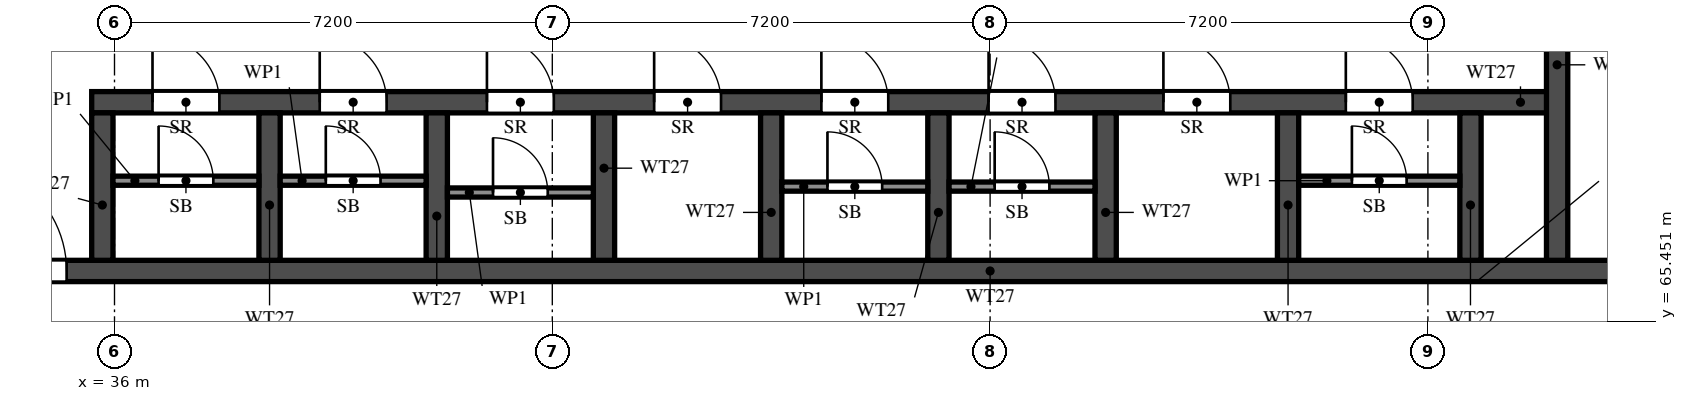
"""IFC4 building model, lengths in metres.
Left out: names, types, materials, properties, quantities, classifications, styles, units other than length and angle.
Written with IfcOpenShell. Run it as: python <this file> out.ifc"""

import sys

from ifc_helpers import new_model, si_unit, direction, frame, frame_2d, origin, place, context, subcontext, project, spatial, rectangle, extrude, element, fill, save


model = new_model("IFC4")
c1 = context("Model", 3, precision=1e-05, world=origin(), true_north=direction((0.0, 1.0)))
c2 = subcontext(c1, "Body", "Model", "MODEL_VIEW")
j1 = project(units=[si_unit("LENGTHUNIT", "METRE"), si_unit("PLANEANGLEUNIT", "RADIAN")], contexts=[c1])
p1 = place(None, origin())
s1 = spatial("IfcSite", under=j1, at=p1, CompositionType="ELEMENT")
p2 = place(p1, origin())
s2 = spatial("IfcBuilding", under=s1, at=p2, CompositionType="ELEMENT")
p3 = place(p2, frame((0.0, 0.0, 153.5)))
s3 = spatial("IfcBuildingStorey", under=s2, at=p3, CompositionType="ELEMENT", Elevation=153.5)
p4 = place(p3, frame((29.7, 66.275, 0.0), z_axis=(0.0, 0.0, 1.0), x_axis=(1.0, 0.0, 0.0)))
e1 = element("IfcWall", 1, at=p4, inside=s3, PredefinedType="SHEAR", context=c2, shape_type="SweptSolid", body=[
    extrude(rectangle(XDim=41.4, YDim=0.35, at=frame_2d((20.7, 0.0))), origin(), (0.0, 0.0, 1.0), 3.2),
])
p5 = place(p4, frame((0.925, 0.0, 0.0)))
e2 = element("IfcOpeningElement", 2, at=p5, cuts=e1, PredefinedType="OPENING", context=c2, shape_type="SweptSolid", body=[
    extrude(rectangle(XDim=1.1, YDim=2.1, at=frame_2d((0.55, 1.05))), frame((0.0, 0.185, 0.0), z_axis=(0.0, -1.0, 0.0), x_axis=(1.0, 0.0, 0.0)), (0.0, 0.0, 1.0), 0.37),
])
p6 = place(p4, frame((3.712, 0.0, 0.0)))
e3 = element("IfcOpeningElement", 3, at=p6, cuts=e1, PredefinedType="OPENING", context=c2, shape_type="SweptSolid", body=[
    extrude(rectangle(XDim=1.8, YDim=2.1, at=frame_2d((0.9, 1.05))), frame((0.0, 0.185, 0.0), z_axis=(0.0, -1.0, 0.0), x_axis=(1.0, 0.0, 0.0)), (0.0, 0.0, 1.0), 0.37),
])
p7 = place(p3, frame((35.625, 69.05, 0.0), z_axis=(0.0, 0.0, 1.0), x_axis=(1.0, 0.0, 0.0)))
e4 = element("IfcWall", 4, at=p7, inside=s3, PredefinedType="SHEAR", context=c2, shape_type="SweptSolid", body=[
    extrude(rectangle(XDim=24.1, YDim=0.35, at=frame_2d((12.05, 0.0))), origin(), (0.0, 0.0, 1.0), 3.2),
])
p8 = place(p7, frame((1.0, 0.0, 0.0)))
e5 = element("IfcOpeningElement", 5, at=p8, cuts=e4, PredefinedType="OPENING", context=c2, shape_type="SweptSolid", body=[
    extrude(rectangle(XDim=1.1, YDim=2.1, at=frame_2d((0.55, 1.05))), frame((0.0, 0.185, 0.0), z_axis=(0.0, -1.0, 0.0), x_axis=(1.0, 0.0, 0.0)), (0.0, 0.0, 1.0), 0.37),
])
p9 = place(p7, frame((3.75, 0.0, 0.0)))
e6 = element("IfcOpeningElement", 6, at=p9, cuts=e4, PredefinedType="OPENING", context=c2, shape_type="SweptSolid", body=[
    extrude(rectangle(XDim=1.1, YDim=2.1, at=frame_2d((0.55, 1.05))), frame((0.0, 0.185, 0.0), z_axis=(0.0, -1.0, 0.0), x_axis=(1.0, 0.0, 0.0)), (0.0, 0.0, 1.0), 0.37),
])
p10 = place(p7, frame((6.5, 0.0, 0.0)))
e7 = element("IfcOpeningElement", 7, at=p10, cuts=e4, PredefinedType="OPENING", context=c2, shape_type="SweptSolid", body=[
    extrude(rectangle(XDim=1.1, YDim=2.1, at=frame_2d((0.55, 1.05))), frame((0.0, 0.185, 0.0), z_axis=(0.0, -1.0, 0.0), x_axis=(1.0, 0.0, 0.0)), (0.0, 0.0, 1.0), 0.37),
])
p11 = place(p7, frame((9.25, 0.0, 0.0)))
e8 = element("IfcOpeningElement", 8, at=p11, cuts=e4, PredefinedType="OPENING", context=c2, shape_type="SweptSolid", body=[
    extrude(rectangle(XDim=1.1, YDim=2.1, at=frame_2d((0.55, 1.05))), frame((0.0, 0.185, 0.0), z_axis=(0.0, -1.0, 0.0), x_axis=(1.0, 0.0, 0.0)), (0.0, 0.0, 1.0), 0.37),
])
p12 = place(p7, frame((12.0, 0.0, 0.0)))
e9 = element("IfcOpeningElement", 9, at=p12, cuts=e4, PredefinedType="OPENING", context=c2, shape_type="SweptSolid", body=[
    extrude(rectangle(XDim=1.1, YDim=2.1, at=frame_2d((0.55, 1.05))), frame((0.0, 0.185, 0.0), z_axis=(0.0, -1.0, 0.0), x_axis=(1.0, 0.0, 0.0)), (0.0, 0.0, 1.0), 0.37),
])
p13 = place(p7, frame((14.75, 0.0, 0.0)))
e10 = element("IfcOpeningElement", 10, at=p13, cuts=e4, PredefinedType="OPENING", context=c2, shape_type="SweptSolid", body=[
    extrude(rectangle(XDim=1.1, YDim=2.1, at=frame_2d((0.55, 1.05))), frame((0.0, 0.185, 0.0), z_axis=(0.0, -1.0, 0.0), x_axis=(1.0, 0.0, 0.0)), (0.0, 0.0, 1.0), 0.37),
])
p14 = place(p7, frame((17.625, 0.0, 0.0)))
e11 = element("IfcOpeningElement", 11, at=p14, cuts=e4, PredefinedType="OPENING", context=c2, shape_type="SweptSolid", body=[
    extrude(rectangle(XDim=1.1, YDim=2.1, at=frame_2d((0.55, 1.05))), frame((0.0, 0.185, 0.0), z_axis=(0.0, -1.0, 0.0), x_axis=(1.0, 0.0, 0.0)), (0.0, 0.0, 1.0), 0.37),
])
p15 = place(p7, frame((20.625, 0.0, 0.0)))
e12 = element("IfcOpeningElement", 12, at=p15, cuts=e4, PredefinedType="OPENING", context=c2, shape_type="SweptSolid", body=[
    extrude(rectangle(XDim=1.1, YDim=2.1, at=frame_2d((0.55, 1.05))), frame((0.0, 0.185, 0.0), z_axis=(0.0, -1.0, 0.0), x_axis=(1.0, 0.0, 0.0)), (0.0, 0.0, 1.0), 0.37),
])
p16 = place(p3, frame((59.725, 66.45, 0.0), z_axis=(0.0, 0.0, 1.0), x_axis=(0.0, 1.0, 0.0)))
e13 = element("IfcWall", 13, at=p16, inside=s3, PredefinedType="SHEAR", context=c2, shape_type="SweptSolid", body=[
    extrude(rectangle(XDim=6.125, YDim=0.35, at=frame_2d((3.062, 0.0))), origin(), (0.0, 0.0, 1.0), 3.2),
])
p17 = place(p16, frame((3.85, 0.0, 0.0)))
e14 = element("IfcOpeningElement", 14, at=p17, cuts=e13, PredefinedType="OPENING", context=c2, shape_type="SweptSolid", body=[
    extrude(rectangle(XDim=1.2, YDim=2.1, at=frame_2d((0.6, 1.05))), frame((0.0, 0.185, 0.0), z_axis=(0.0, -1.0, 0.0), x_axis=(1.0, 0.0, 0.0)), (0.0, 0.0, 1.0), 0.37),
])
for number, where, z_axis, x_axis in (
    (15, (35.8, 66.45, 0.0), (0.0, 0.0, 1.0), (0.0, 1.0, 0.0)),
    (16, (38.55, 66.45, 0.0), (0.0, 0.0, 1.0), (0.0, 1.0, 0.0)),
    (17, (41.3, 66.45, 0.0), (0.0, 0.0, 1.0), (0.0, 1.0, 0.0)),
    (18, (44.05, 66.45, 0.0), (0.0, 0.0, 1.0), (0.0, 1.0, 0.0)),
    (19, (46.8, 66.45, 0.0), (0.0, 0.0, 1.0), (0.0, 1.0, 0.0)),
    (20, (49.55, 66.45, 0.0), (0.0, 0.0, 1.0), (0.0, 1.0, 0.0)),
    (21, (52.3, 66.45, 0.0), (0.0, 0.0, 1.0), (0.0, 1.0, 0.0)),
    (22, (55.3, 66.45, 0.0), (0.0, 0.0, 1.0), (0.0, 1.0, 0.0)),
    (23, (58.3, 66.45, 0.0), (0.0, 0.0, 1.0), (0.0, 1.0, 0.0)),
):
    element("IfcWall", number, at=place(p3, frame(where, z_axis=z_axis, x_axis=x_axis)), inside=s3, PredefinedType="SHEAR", context=c2, shape_type="SweptSolid", body=[
        extrude(rectangle(XDim=2.425, YDim=0.35, at=frame_2d((1.212, 0.0))), origin(), (0.0, 0.0, 1.0), 3.2),
    ])
p18 = place(p3, frame((35.975, 67.76, 0.0), z_axis=(0.0, 0.0, 1.0), x_axis=(1.0, 0.0, 0.0)))
e24 = element("IfcWall", 24, at=p18, inside=s3, PredefinedType="PARTITIONING", context=c2, shape_type="SweptSolid", body=[
    extrude(rectangle(XDim=2.4, YDim=0.15, at=frame_2d((1.2, 0.0))), origin(), (0.0, 0.0, 1.0), 3.2),
])
p19 = place(p18, frame((0.75, 0.0, 0.0)))
e25 = element("IfcOpeningElement", 25, at=p19, cuts=e24, PredefinedType="OPENING", context=c2, shape_type="SweptSolid", body=[
    extrude(rectangle(XDim=0.9, YDim=2.1, at=frame_2d((0.45, 1.05))), frame((0.0, 0.085, 0.0), z_axis=(0.0, -1.0, 0.0), x_axis=(1.0, 0.0, 0.0)), (0.0, 0.0, 1.0), 0.17),
])
p20 = place(p3, frame((38.725, 67.76, 0.0), z_axis=(0.0, 0.0, 1.0), x_axis=(1.0, 0.0, 0.0)))
e26 = element("IfcWall", 26, at=p20, inside=s3, PredefinedType="PARTITIONING", context=c2, shape_type="SweptSolid", body=[
    extrude(rectangle(XDim=2.4, YDim=0.15, at=frame_2d((1.2, 0.0))), origin(), (0.0, 0.0, 1.0), 3.2),
])
p21 = place(p20, frame((0.75, 0.0, 0.0)))
e27 = element("IfcOpeningElement", 27, at=p21, cuts=e26, PredefinedType="OPENING", context=c2, shape_type="SweptSolid", body=[
    extrude(rectangle(XDim=0.9, YDim=2.1, at=frame_2d((0.45, 1.05))), frame((0.0, 0.085, 0.0), z_axis=(0.0, -1.0, 0.0), x_axis=(1.0, 0.0, 0.0)), (0.0, 0.0, 1.0), 0.17),
])
p22 = place(p3, frame((41.475, 67.565, 0.0), z_axis=(0.0, 0.0, 1.0), x_axis=(1.0, 0.0, 0.0)))
e28 = element("IfcWall", 28, at=p22, inside=s3, PredefinedType="PARTITIONING", context=c2, shape_type="SweptSolid", body=[
    extrude(rectangle(XDim=2.4, YDim=0.15, at=frame_2d((1.2, 0.0))), origin(), (0.0, 0.0, 1.0), 3.2),
])
p23 = place(p22, frame((0.75, 0.0, 0.0)))
e29 = element("IfcOpeningElement", 29, at=p23, cuts=e28, PredefinedType="OPENING", context=c2, shape_type="SweptSolid", body=[
    extrude(rectangle(XDim=0.9, YDim=2.1, at=frame_2d((0.45, 1.05))), frame((0.0, 0.085, 0.0), z_axis=(0.0, -1.0, 0.0), x_axis=(1.0, 0.0, 0.0)), (0.0, 0.0, 1.0), 0.17),
])
p24 = place(p3, frame((46.975, 67.663, 0.0), z_axis=(0.0, 0.0, 1.0), x_axis=(1.0, 0.0, 0.0)))
e30 = element("IfcWall", 30, at=p24, inside=s3, PredefinedType="PARTITIONING", context=c2, shape_type="SweptSolid", body=[
    extrude(rectangle(XDim=2.4, YDim=0.15, at=frame_2d((1.2, 0.0))), origin(), (0.0, 0.0, 1.0), 3.2),
])
p25 = place(p24, frame((0.75, 0.0, 0.0)))
e31 = element("IfcOpeningElement", 31, at=p25, cuts=e30, PredefinedType="OPENING", context=c2, shape_type="SweptSolid", body=[
    extrude(rectangle(XDim=0.9, YDim=2.1, at=frame_2d((0.45, 1.05))), frame((0.0, 0.085, 0.0), z_axis=(0.0, -1.0, 0.0), x_axis=(1.0, 0.0, 0.0)), (0.0, 0.0, 1.0), 0.17),
])
p26 = place(p3, frame((49.725, 67.663, 0.0), z_axis=(0.0, 0.0, 1.0), x_axis=(1.0, 0.0, 0.0)))
e32 = element("IfcWall", 32, at=p26, inside=s3, PredefinedType="PARTITIONING", context=c2, shape_type="SweptSolid", body=[
    extrude(rectangle(XDim=2.4, YDim=0.15, at=frame_2d((1.2, 0.0))), origin(), (0.0, 0.0, 1.0), 3.2),
])
p27 = place(p26, frame((0.75, 0.0, 0.0)))
e33 = element("IfcOpeningElement", 33, at=p27, cuts=e32, PredefinedType="OPENING", context=c2, shape_type="SweptSolid", body=[
    extrude(rectangle(XDim=0.9, YDim=2.1, at=frame_2d((0.45, 1.05))), frame((0.0, 0.085, 0.0), z_axis=(0.0, -1.0, 0.0), x_axis=(1.0, 0.0, 0.0)), (0.0, 0.0, 1.0), 0.17),
])
p28 = place(p3, frame((55.475, 67.76, 0.0), z_axis=(0.0, 0.0, 1.0), x_axis=(1.0, 0.0, 0.0)))
e34 = element("IfcWall", 34, at=p28, inside=s3, PredefinedType="PARTITIONING", context=c2, shape_type="SweptSolid", body=[
    extrude(rectangle(XDim=2.65, YDim=0.15, at=frame_2d((1.325, 0.0))), origin(), (0.0, 0.0, 1.0), 3.2),
])
p29 = place(p28, frame((0.875, 0.0, 0.0)))
e35 = element("IfcOpeningElement", 35, at=p29, cuts=e34, PredefinedType="OPENING", context=c2, shape_type="SweptSolid", body=[
    extrude(rectangle(XDim=0.9, YDim=2.1, at=frame_2d((0.45, 1.05))), frame((0.0, 0.085, 0.0), z_axis=(0.0, -1.0, 0.0), x_axis=(1.0, 0.0, 0.0)), (0.0, 0.0, 1.0), 0.17),
])
p30 = place(p6, origin())
e36 = element("IfcDoor", 36, at=p30, inside=s3, OperationType="DOUBLE_DOOR_SINGLE_SWING", PredefinedType="DOOR", context=c2, shape_type="SweptSolid", body=[
    extrude(rectangle(XDim=1.8, YDim=2.1, at=frame_2d((0.9, 1.05))), frame((0.0, 0.025, 0.0), z_axis=(0.0, -1.0, 0.0), x_axis=(1.0, 0.0, 0.0)), (0.0, 0.0, 1.0), 0.05),
])
fill(e3, e36)
p31 = place(p8, origin())
e37 = element("IfcDoor", 37, at=p31, inside=s3, OperationType="SINGLE_SWING_RIGHT", PredefinedType="DOOR", context=c2, shape_type="SweptSolid", body=[
    extrude(rectangle(XDim=1.1, YDim=2.1, at=frame_2d((0.55, 1.05))), frame((0.0, 0.025, 0.0), z_axis=(0.0, -1.0, 0.0), x_axis=(1.0, 0.0, 0.0)), (0.0, 0.0, 1.0), 0.05),
])
fill(e5, e37)
p32 = place(p19, origin())
e38 = element("IfcDoor", 38, at=p32, inside=s3, OperationType="SINGLE_SWING_LEFT", PredefinedType="DOOR", context=c2, shape_type="SweptSolid", body=[
    extrude(rectangle(XDim=0.9, YDim=2.1, at=frame_2d((0.45, 1.05))), frame((0.0, 0.025, 0.0), z_axis=(0.0, -1.0, 0.0), x_axis=(1.0, 0.0, 0.0)), (0.0, 0.0, 1.0), 0.05),
])
fill(e25, e38)
p33 = place(p9, origin())
e39 = element("IfcDoor", 39, at=p33, inside=s3, OperationType="SINGLE_SWING_LEFT", PredefinedType="DOOR", context=c2, shape_type="SweptSolid", body=[
    extrude(rectangle(XDim=1.1, YDim=2.1, at=frame_2d((0.55, 1.05))), frame((0.0, 0.025, 0.0), z_axis=(0.0, -1.0, 0.0), x_axis=(1.0, 0.0, 0.0)), (0.0, 0.0, 1.0), 0.05),
])
fill(e6, e39)
p34 = place(p21, origin())
e40 = element("IfcDoor", 40, at=p34, inside=s3, OperationType="SINGLE_SWING_RIGHT", PredefinedType="DOOR", context=c2, shape_type="SweptSolid", body=[
    extrude(rectangle(XDim=0.9, YDim=2.1, at=frame_2d((0.45, 1.05))), frame((0.0, 0.025, 0.0), z_axis=(0.0, -1.0, 0.0), x_axis=(1.0, 0.0, 0.0)), (0.0, 0.0, 1.0), 0.05),
])
fill(e27, e40)
p35 = place(p10, origin())
e41 = element("IfcDoor", 41, at=p35, inside=s3, OperationType="SINGLE_SWING_RIGHT", PredefinedType="DOOR", context=c2, shape_type="SweptSolid", body=[
    extrude(rectangle(XDim=1.1, YDim=2.1, at=frame_2d((0.55, 1.05))), frame((0.0, 0.025, 0.0), z_axis=(0.0, -1.0, 0.0), x_axis=(1.0, 0.0, 0.0)), (0.0, 0.0, 1.0), 0.05),
])
fill(e7, e41)
p36 = place(p23, origin())
e42 = element("IfcDoor", 42, at=p36, inside=s3, OperationType="SINGLE_SWING_RIGHT", PredefinedType="DOOR", context=c2, shape_type="SweptSolid", body=[
    extrude(rectangle(XDim=0.9, YDim=2.1, at=frame_2d((0.45, 1.05))), frame((0.0, 0.025, 0.0), z_axis=(0.0, -1.0, 0.0), x_axis=(1.0, 0.0, 0.0)), (0.0, 0.0, 1.0), 0.05),
])
fill(e29, e42)
p37 = place(p11, origin())
e43 = element("IfcDoor", 43, at=p37, inside=s3, OperationType="SINGLE_SWING_LEFT", PredefinedType="DOOR", context=c2, shape_type="SweptSolid", body=[
    extrude(rectangle(XDim=1.1, YDim=2.1, at=frame_2d((0.55, 1.05))), frame((0.0, 0.025, 0.0), z_axis=(0.0, -1.0, 0.0), x_axis=(1.0, 0.0, 0.0)), (0.0, 0.0, 1.0), 0.05),
])
fill(e8, e43)
p38 = place(p12, origin())
e44 = element("IfcDoor", 44, at=p38, inside=s3, OperationType="SINGLE_SWING_RIGHT", PredefinedType="DOOR", context=c2, shape_type="SweptSolid", body=[
    extrude(rectangle(XDim=1.1, YDim=2.1, at=frame_2d((0.55, 1.05))), frame((0.0, 0.025, 0.0), z_axis=(0.0, -1.0, 0.0), x_axis=(1.0, 0.0, 0.0)), (0.0, 0.0, 1.0), 0.05),
])
fill(e9, e44)
p39 = place(p25, origin())
e45 = element("IfcDoor", 45, at=p39, inside=s3, OperationType="SINGLE_SWING_RIGHT", PredefinedType="DOOR", context=c2, shape_type="SweptSolid", body=[
    extrude(rectangle(XDim=0.9, YDim=2.1, at=frame_2d((0.45, 1.05))), frame((0.0, 0.025, 0.0), z_axis=(0.0, -1.0, 0.0), x_axis=(1.0, 0.0, 0.0)), (0.0, 0.0, 1.0), 0.05),
])
fill(e31, e45)
p40 = place(p13, origin())
e46 = element("IfcDoor", 46, at=p40, inside=s3, OperationType="SINGLE_SWING_LEFT", PredefinedType="DOOR", context=c2, shape_type="SweptSolid", body=[
    extrude(rectangle(XDim=1.1, YDim=2.1, at=frame_2d((0.55, 1.05))), frame((0.0, 0.025, 0.0), z_axis=(0.0, -1.0, 0.0), x_axis=(1.0, 0.0, 0.0)), (0.0, 0.0, 1.0), 0.05),
])
fill(e10, e46)
p41 = place(p27, origin())
e47 = element("IfcDoor", 47, at=p41, inside=s3, OperationType="SINGLE_SWING_LEFT", PredefinedType="DOOR", context=c2, shape_type="SweptSolid", body=[
    extrude(rectangle(XDim=0.9, YDim=2.1, at=frame_2d((0.45, 1.05))), frame((0.0, 0.025, 0.0), z_axis=(0.0, -1.0, 0.0), x_axis=(1.0, 0.0, 0.0)), (0.0, 0.0, 1.0), 0.05),
])
fill(e33, e47)
p42 = place(p14, origin())
e48 = element("IfcDoor", 48, at=p42, inside=s3, OperationType="SINGLE_SWING_RIGHT", PredefinedType="DOOR", context=c2, shape_type="SweptSolid", body=[
    extrude(rectangle(XDim=1.1, YDim=2.1, at=frame_2d((0.55, 1.05))), frame((0.0, 0.025, 0.0), z_axis=(0.0, -1.0, 0.0), x_axis=(1.0, 0.0, 0.0)), (0.0, 0.0, 1.0), 0.05),
])
fill(e11, e48)
p43 = place(p15, origin())
e49 = element("IfcDoor", 49, at=p43, inside=s3, OperationType="SINGLE_SWING_RIGHT", PredefinedType="DOOR", context=c2, shape_type="SweptSolid", body=[
    extrude(rectangle(XDim=1.1, YDim=2.1, at=frame_2d((0.55, 1.05))), frame((0.0, 0.025, 0.0), z_axis=(0.0, -1.0, 0.0), x_axis=(1.0, 0.0, 0.0)), (0.0, 0.0, 1.0), 0.05),
])
fill(e12, e49)
p44 = place(p29, origin())
e50 = element("IfcDoor", 50, at=p44, inside=s3, OperationType="SINGLE_SWING_LEFT", PredefinedType="DOOR", context=c2, shape_type="SweptSolid", body=[
    extrude(rectangle(XDim=0.9, YDim=2.1, at=frame_2d((0.45, 1.05))), frame((0.0, 0.025, 0.0), z_axis=(0.0, -1.0, 0.0), x_axis=(1.0, 0.0, 0.0)), (0.0, 0.0, 1.0), 0.05),
])
fill(e35, e50)
save(model, sys.argv[1])
